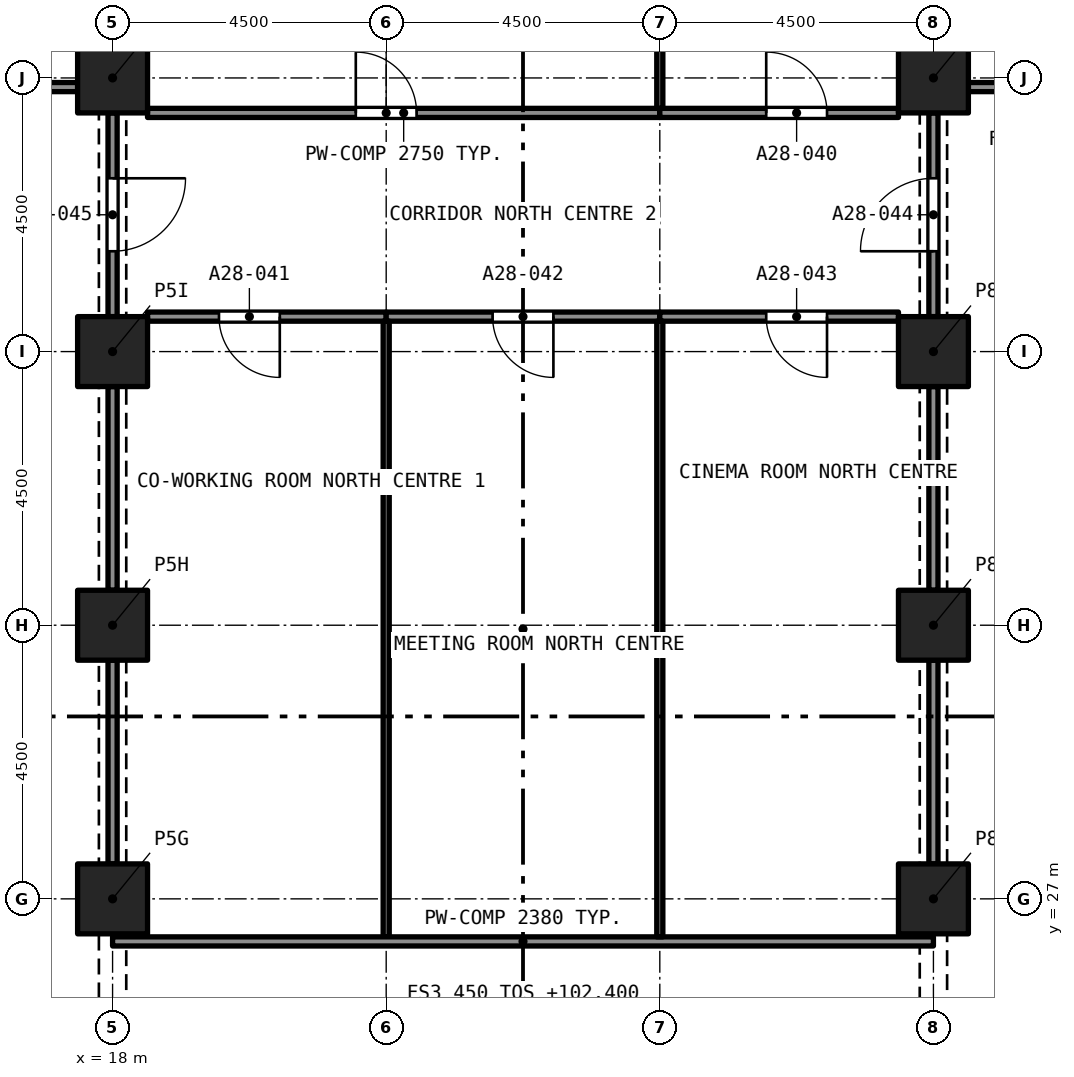
"""IFC4 building model, lengths in metres.
Left out: names, types, materials, properties, quantities, classifications, styles, units other than length and angle.
Written with IfcOpenShell. Run it as: python <this file> out.ifc"""

import sys

from ifc_helpers import new_model, si_unit, direction, frame, frame_2d, origin, origin_2d, place, context, subcontext, project, spatial, rectangle, extrude, element, fill, save


model = new_model("IFC4")
c1 = context("Model", 3, precision=1e-05, world=origin(), true_north=direction((0.0, 1.0)))
c2 = subcontext(c1, "Body", "Model", "MODEL_VIEW")
j1 = project(units=[si_unit("LENGTHUNIT", "METRE"), si_unit("PLANEANGLEUNIT", "RADIAN")], contexts=[c1])
p1 = place(None, origin())
s1 = spatial("IfcSite", under=j1, at=p1, CompositionType="ELEMENT")
p2 = place(p1, origin())
s2 = spatial("IfcBuilding", under=s1, at=p2, CompositionType="ELEMENT")
p3 = place(p2, frame((0.0, 0.0, 102.4)))
s3 = spatial("IfcBuildingStorey", under=s2, at=p3, CompositionType="ELEMENT", Elevation=102.4)
for number, where, z_axis, x_axis in (
    (1, (18.0, 27.0, 0.0), (0.0, 0.0, 1.0), (1.0, 0.0, 0.0)),
    (2, (31.5, 27.0, 0.0), (0.0, 0.0, 1.0), (1.0, 0.0, 0.0)),
    (3, (18.0, 31.5, 0.0), (0.0, 0.0, 1.0), (1.0, 0.0, 0.0)),
    (4, (31.5, 31.5, 0.0), (0.0, 0.0, 1.0), (1.0, 0.0, 0.0)),
    (5, (18.0, 36.0, 0.0), (0.0, 0.0, 1.0), (1.0, 0.0, 0.0)),
    (6, (31.5, 36.0, 0.0), (0.0, 0.0, 1.0), (1.0, 0.0, 0.0)),
    (7, (18.0, 40.5, 0.0), (0.0, 0.0, 1.0), (1.0, 0.0, 0.0)),
    (8, (31.5, 40.5, 0.0), (0.0, 0.0, 1.0), (1.0, 0.0, 0.0)),
):
    element("IfcColumn", number, at=place(p3, frame(where, z_axis=z_axis, x_axis=x_axis)), inside=s3, PredefinedType="COLUMN", context=c2, shape_type="SweptSolid", body=[
        extrude(rectangle(XDim=1.15, YDim=1.15, at=origin_2d()), origin(), (0.0, 0.0, 1.0), 3.2),
    ])
p4 = place(p3, frame((13.35, 40.35, 0.0), z_axis=(0.0, 0.0, 1.0), x_axis=(1.0, 0.0, 0.0)))
e9 = element("IfcWall", 9, at=p4, inside=s3, PredefinedType="PARTITIONING", context=c2, shape_type="SweptSolid", body=[
    extrude(rectangle(XDim=4.075, YDim=0.15, at=frame_2d((2.038, 0.0))), origin(), (0.0, 0.0, 1.0), 2.9),
])
p5 = place(p3, frame((32.075, 40.35, 0.0), z_axis=(0.0, 0.0, 1.0), x_axis=(1.0, 0.0, 0.0)))
e10 = element("IfcWall", 10, at=p5, inside=s3, PredefinedType="PARTITIONING", context=c2, shape_type="SweptSolid", body=[
    extrude(rectangle(XDim=2.275, YDim=0.15, at=frame_2d((1.138, 0.0))), origin(), (0.0, 0.0, 1.0), 2.9),
])
p6 = place(p5, frame((1.145, 0.0, 0.0)))
e11 = element("IfcOpeningElement", 11, at=p6, cuts=e10, PredefinedType="OPENING", context=c2, shape_type="SweptSolid", body=[
    extrude(rectangle(XDim=1.0, YDim=2.1, at=frame_2d((0.5, 1.05))), frame((0.0, 0.085, 0.0), z_axis=(0.0, -1.0, 0.0), x_axis=(1.0, 0.0, 0.0)), (0.0, 0.0, 1.0), 0.17),
])
p7 = place(p3, frame((18.575, 39.925, 0.0), z_axis=(0.0, 0.0, 1.0), x_axis=(1.0, 0.0, 0.0)))
e12 = element("IfcWall", 12, at=p7, inside=s3, PredefinedType="PARTITIONING", context=c2, shape_type="SweptSolid", body=[
    extrude(rectangle(XDim=8.425, YDim=0.15, at=frame_2d((4.212, 0.0))), origin(), (0.0, 0.0, 1.0), 2.75),
])
p8 = place(p7, frame((3.425, 0.0, 0.0)))
e13 = element("IfcOpeningElement", 13, at=p8, cuts=e12, PredefinedType="OPENING", context=c2, shape_type="SweptSolid", body=[
    extrude(rectangle(XDim=1.0, YDim=2.1, at=frame_2d((0.5, 1.05))), frame((0.0, 0.085, 0.0), z_axis=(0.0, -1.0, 0.0), x_axis=(1.0, 0.0, 0.0)), (0.0, 0.0, 1.0), 0.17),
])
p9 = place(p3, frame((27.0, 39.925, 0.0), z_axis=(0.0, 0.0, 1.0), x_axis=(1.0, 0.0, 0.0)))
e14 = element("IfcWall", 14, at=p9, inside=s3, PredefinedType="PARTITIONING", context=c2, shape_type="SweptSolid", body=[
    extrude(rectangle(XDim=3.925, YDim=0.15, at=frame_2d((1.962, 0.0))), origin(), (0.0, 0.0, 1.0), 2.75),
])
p10 = place(p9, frame((1.75, 0.0, 0.0)))
e15 = element("IfcOpeningElement", 15, at=p10, cuts=e14, PredefinedType="OPENING", context=c2, shape_type="SweptSolid", body=[
    extrude(rectangle(XDim=1.0, YDim=2.1, at=frame_2d((0.5, 1.05))), frame((0.0, 0.085, 0.0), z_axis=(0.0, -1.0, 0.0), x_axis=(1.0, 0.0, 0.0)), (0.0, 0.0, 1.0), 0.17),
])
p11 = place(p3, frame((22.5, 36.575, 0.0), z_axis=(0.0, 0.0, 1.0), x_axis=(-1.0, 0.0, 0.0)))
e16 = element("IfcWall", 16, at=p11, inside=s3, PredefinedType="PARTITIONING", context=c2, shape_type="SweptSolid", body=[
    extrude(rectangle(XDim=3.925, YDim=0.15, at=frame_2d((1.962, 0.0))), origin(), (0.0, 0.0, 1.0), 2.75),
])
p12 = place(p11, frame((1.75, 0.0, 0.0)))
e17 = element("IfcOpeningElement", 17, at=p12, cuts=e16, PredefinedType="OPENING", context=c2, shape_type="SweptSolid", body=[
    extrude(rectangle(XDim=1.0, YDim=2.1, at=frame_2d((0.5, 1.05))), frame((0.0, 0.085, 0.0), z_axis=(0.0, -1.0, 0.0), x_axis=(1.0, 0.0, 0.0)), (0.0, 0.0, 1.0), 0.17),
])
p13 = place(p3, frame((27.0, 36.575, 0.0), z_axis=(0.0, 0.0, 1.0), x_axis=(-1.0, 0.0, 0.0)))
e18 = element("IfcWall", 18, at=p13, inside=s3, PredefinedType="PARTITIONING", context=c2, shape_type="SweptSolid", body=[
    extrude(rectangle(XDim=4.5, YDim=0.15, at=frame_2d((2.25, 0.0))), origin(), (0.0, 0.0, 1.0), 2.75),
])
p14 = place(p13, frame((1.75, 0.0, 0.0)))
e19 = element("IfcOpeningElement", 19, at=p14, cuts=e18, PredefinedType="OPENING", context=c2, shape_type="SweptSolid", body=[
    extrude(rectangle(XDim=1.0, YDim=2.1, at=frame_2d((0.5, 1.05))), frame((0.0, 0.085, 0.0), z_axis=(0.0, -1.0, 0.0), x_axis=(1.0, 0.0, 0.0)), (0.0, 0.0, 1.0), 0.17),
])
p15 = place(p3, frame((30.925, 36.575, 0.0), z_axis=(0.0, 0.0, 1.0), x_axis=(-1.0, 0.0, 0.0)))
e20 = element("IfcWall", 20, at=p15, inside=s3, PredefinedType="PARTITIONING", context=c2, shape_type="SweptSolid", body=[
    extrude(rectangle(XDim=3.925, YDim=0.15, at=frame_2d((1.962, 0.0))), origin(), (0.0, 0.0, 1.0), 2.75),
])
p16 = place(p15, frame((1.175, 0.0, 0.0)))
e21 = element("IfcOpeningElement", 21, at=p16, cuts=e20, PredefinedType="OPENING", context=c2, shape_type="SweptSolid", body=[
    extrude(rectangle(XDim=1.0, YDim=2.1, at=frame_2d((0.5, 1.05))), frame((0.0, 0.085, 0.0), z_axis=(0.0, -1.0, 0.0), x_axis=(1.0, 0.0, 0.0)), (0.0, 0.0, 1.0), 0.17),
])
p17 = place(p3, frame((31.5, 36.575, 0.0), z_axis=(0.0, 0.0, 1.0), x_axis=(0.0, 1.0, 0.0)))
e22 = element("IfcWall", 22, at=p17, inside=s3, PredefinedType="PARTITIONING", context=c2, shape_type="SweptSolid", body=[
    extrude(rectangle(XDim=3.35, YDim=0.15, at=frame_2d((1.675, 0.0))), origin(), (0.0, 0.0, 1.0), 2.38),
])
p18 = place(p17, frame((1.075, 0.0, 0.0)))
e23 = element("IfcOpeningElement", 23, at=p18, cuts=e22, PredefinedType="OPENING", context=c2, shape_type="SweptSolid", body=[
    extrude(rectangle(XDim=1.2, YDim=2.1, at=frame_2d((0.6, 1.05))), frame((0.0, 0.085, 0.0), z_axis=(0.0, -1.0, 0.0), x_axis=(1.0, 0.0, 0.0)), (0.0, 0.0, 1.0), 0.17),
])
p19 = place(p3, frame((18.0, 39.925, 0.0), z_axis=(0.0, 0.0, 1.0), x_axis=(0.0, -1.0, 0.0)))
e24 = element("IfcWall", 24, at=p19, inside=s3, PredefinedType="PARTITIONING", context=c2, shape_type="SweptSolid", body=[
    extrude(rectangle(XDim=3.35, YDim=0.15, at=frame_2d((1.675, 0.0))), origin(), (0.0, 0.0, 1.0), 2.38),
])
p20 = place(p19, frame((1.075, 0.0, 0.0)))
e25 = element("IfcOpeningElement", 25, at=p20, cuts=e24, PredefinedType="OPENING", context=c2, shape_type="SweptSolid", body=[
    extrude(rectangle(XDim=1.2, YDim=2.1, at=frame_2d((0.6, 1.05))), frame((0.0, 0.085, 0.0), z_axis=(0.0, -1.0, 0.0), x_axis=(1.0, 0.0, 0.0)), (0.0, 0.0, 1.0), 0.17),
])
p21 = place(p3, frame((27.0, 40.0, 0.0), z_axis=(0.0, 0.0, 1.0), x_axis=(0.0, 1.0, 0.0)))
e26 = element("IfcWall", 26, at=p21, inside=s3, PredefinedType="PARTITIONING", context=c2, shape_type="SweptSolid", body=[
    extrude(rectangle(XDim=8.925, YDim=0.1, at=frame_2d((4.462, 0.0))), origin(), (0.0, 0.0, 1.0), 2.75),
])
p22 = place(p3, frame((22.5, 26.375, 0.0), z_axis=(0.0, 0.0, 1.0), x_axis=(0.0, 1.0, 0.0)))
e27 = element("IfcWall", 27, at=p22, inside=s3, PredefinedType="PARTITIONING", context=c2, shape_type="SweptSolid", body=[
    extrude(rectangle(XDim=10.125, YDim=0.1, at=frame_2d((5.062, 0.0))), origin(), (0.0, 0.0, 1.0), 2.75),
])
for number, where, z_axis, x_axis in (
    (28, (18.0, 27.575, 0.0), (0.0, 0.0, 1.0), (0.0, 1.0, 0.0)),
    (29, (18.0, 32.075, 0.0), (0.0, 0.0, 1.0), (0.0, 1.0, 0.0)),
):
    element("IfcWall", number, at=place(p3, frame(where, z_axis=z_axis, x_axis=x_axis)), inside=s3, PredefinedType="PARTITIONING", context=c2, shape_type="SweptSolid", body=[
        extrude(rectangle(XDim=3.35, YDim=0.15, at=frame_2d((1.675, 0.0))), origin(), (0.0, 0.0, 1.0), 2.38),
    ])
p23 = place(p3, frame((18.0, 26.3, 0.0), z_axis=(0.0, 0.0, 1.0), x_axis=(1.0, 0.0, 0.0)))
e30 = element("IfcWall", 30, at=p23, inside=s3, PredefinedType="PARTITIONING", context=c2, shape_type="SweptSolid", body=[
    extrude(rectangle(XDim=13.5, YDim=0.15, at=frame_2d((6.75, 0.0))), origin(), (0.0, 0.0, 1.0), 2.38),
])
p24 = place(p3, frame((27.0, 26.375, 0.0), z_axis=(0.0, 0.0, 1.0), x_axis=(0.0, 1.0, 0.0)))
e31 = element("IfcWall", 31, at=p24, inside=s3, PredefinedType="PARTITIONING", context=c2, shape_type="SweptSolid", body=[
    extrude(rectangle(XDim=10.125, YDim=0.1, at=frame_2d((5.062, 0.0))), origin(), (0.0, 0.0, 1.0), 2.75),
])
for number, where, z_axis, x_axis in (
    (32, (31.5, 32.075, 0.0), (0.0, 0.0, 1.0), (0.0, 1.0, 0.0)),
    (33, (31.5, 27.575, 0.0), (0.0, 0.0, 1.0), (0.0, 1.0, 0.0)),
):
    element("IfcWall", number, at=place(p3, frame(where, z_axis=z_axis, x_axis=x_axis)), inside=s3, PredefinedType="PARTITIONING", context=c2, shape_type="SweptSolid", body=[
        extrude(rectangle(XDim=3.35, YDim=0.15, at=frame_2d((1.675, 0.0))), origin(), (0.0, 0.0, 1.0), 2.38),
    ])
p25 = place(p8, origin())
e34 = element("IfcDoor", 34, at=p25, inside=s3, OperationType="SINGLE_SWING_LEFT", PredefinedType="DOOR", context=c2, shape_type="SweptSolid", body=[
    extrude(rectangle(XDim=1.0, YDim=2.1, at=frame_2d((0.5, 1.05))), frame((0.0, 0.025, 0.0), z_axis=(0.0, -1.0, 0.0), x_axis=(1.0, 0.0, 0.0)), (0.0, 0.0, 1.0), 0.05),
])
fill(e13, e34)
p26 = place(p10, origin())
e35 = element("IfcDoor", 35, at=p26, inside=s3, OperationType="SINGLE_SWING_RIGHT", PredefinedType="DOOR", context=c2, shape_type="SweptSolid", body=[
    extrude(rectangle(XDim=1.0, YDim=2.1, at=frame_2d((0.5, 1.05))), frame((0.0, 0.025, 0.0), z_axis=(0.0, -1.0, 0.0), x_axis=(1.0, 0.0, 0.0)), (0.0, 0.0, 1.0), 0.05),
])
fill(e15, e35)
p27 = place(p12, origin())
e36 = element("IfcDoor", 36, at=p27, inside=s3, OperationType="SINGLE_SWING_RIGHT", PredefinedType="DOOR", context=c2, shape_type="SweptSolid", body=[
    extrude(rectangle(XDim=1.0, YDim=2.1, at=frame_2d((0.5, 1.05))), frame((0.0, 0.025, 0.0), z_axis=(0.0, -1.0, 0.0), x_axis=(1.0, 0.0, 0.0)), (0.0, 0.0, 1.0), 0.05),
])
fill(e17, e36)
p28 = place(p14, origin())
e37 = element("IfcDoor", 37, at=p28, inside=s3, OperationType="SINGLE_SWING_RIGHT", PredefinedType="DOOR", context=c2, shape_type="SweptSolid", body=[
    extrude(rectangle(XDim=1.0, YDim=2.1, at=frame_2d((0.5, 1.05))), frame((0.0, 0.025, 0.0), z_axis=(0.0, -1.0, 0.0), x_axis=(1.0, 0.0, 0.0)), (0.0, 0.0, 1.0), 0.05),
])
fill(e19, e37)
p29 = place(p16, origin())
e38 = element("IfcDoor", 38, at=p29, inside=s3, OperationType="SINGLE_SWING_LEFT", PredefinedType="DOOR", context=c2, shape_type="SweptSolid", body=[
    extrude(rectangle(XDim=1.0, YDim=2.1, at=frame_2d((0.5, 1.05))), frame((0.0, 0.025, 0.0), z_axis=(0.0, -1.0, 0.0), x_axis=(1.0, 0.0, 0.0)), (0.0, 0.0, 1.0), 0.05),
])
fill(e21, e38)
p30 = place(p18, origin())
e39 = element("IfcDoor", 39, at=p30, inside=s3, OperationType="SINGLE_SWING_LEFT", PredefinedType="DOOR", context=c2, shape_type="SweptSolid", body=[
    extrude(rectangle(XDim=1.2, YDim=2.1, at=frame_2d((0.6, 1.05))), frame((0.0, 0.025, 0.0), z_axis=(0.0, -1.0, 0.0), x_axis=(1.0, 0.0, 0.0)), (0.0, 0.0, 1.0), 0.05),
])
fill(e23, e39)
p31 = place(p20, origin())
e40 = element("IfcDoor", 40, at=p31, inside=s3, OperationType="SINGLE_SWING_LEFT", PredefinedType="DOOR", context=c2, shape_type="SweptSolid", body=[
    extrude(rectangle(XDim=1.2, YDim=2.1, at=frame_2d((0.6, 1.05))), frame((0.0, 0.025, 0.0), z_axis=(0.0, -1.0, 0.0), x_axis=(1.0, 0.0, 0.0)), (0.0, 0.0, 1.0), 0.05),
])
fill(e25, e40)
save(model, sys.argv[1])
